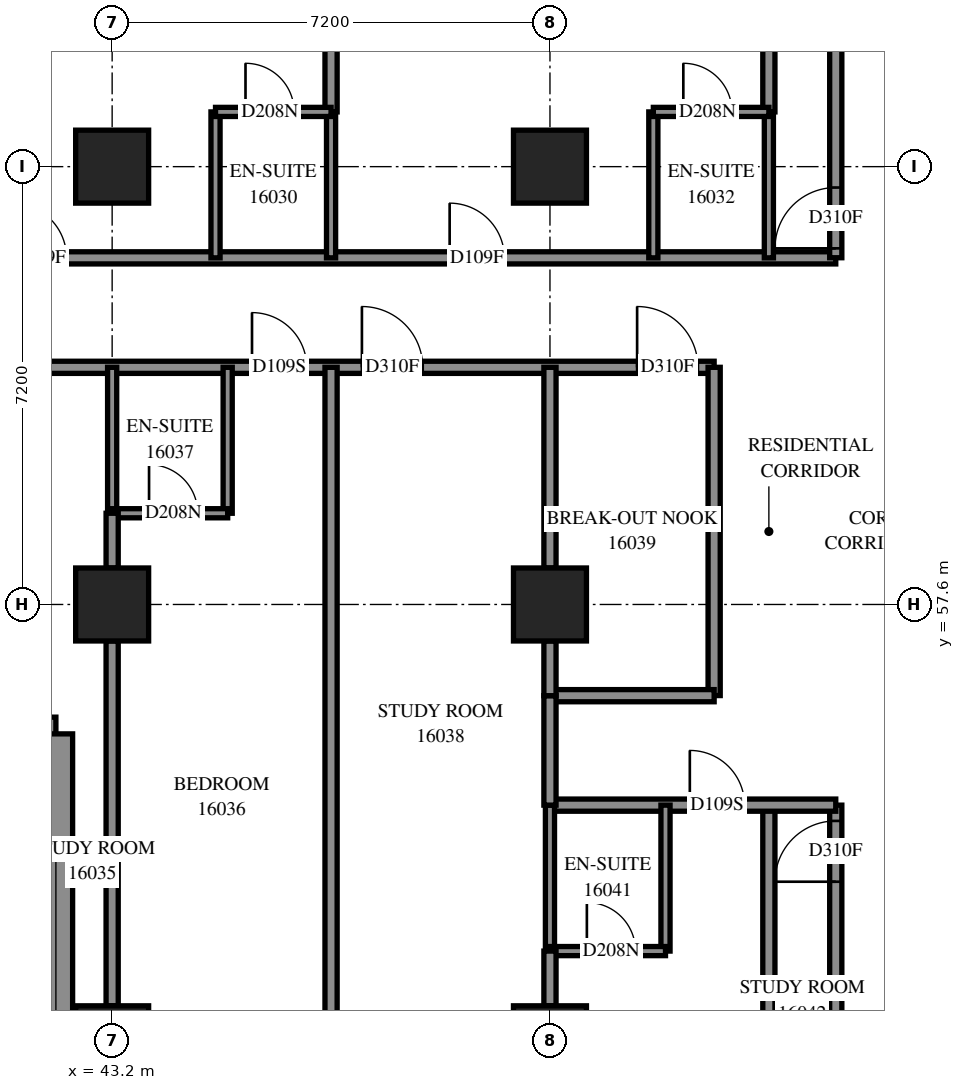
"""IFC4 building model, lengths in metres.
Left out: names, types, materials, properties, quantities, classifications, styles, units other than length and angle.
Written with IfcOpenShell. Run it as: python <this file> out.ifc"""

import sys

from ifc_helpers import new_model, si_unit, direction, frame, frame_2d, origin, origin_2d, place, context, subcontext, project, spatial, polyline, rectangle, outline, extrude, element, fill, save


model = new_model("IFC4")
c1 = context("Model", 3, precision=1e-05, world=origin(), true_north=direction((0.0, 1.0)))
c2 = subcontext(c1, "Body", "Model", "MODEL_VIEW")
j1 = project(units=[si_unit("LENGTHUNIT", "METRE"), si_unit("PLANEANGLEUNIT", "RADIAN")], contexts=[c1])
p1 = place(None, origin())
s1 = spatial("IfcSite", under=j1, at=p1, CompositionType="ELEMENT")
p2 = place(p1, origin())
s2 = spatial("IfcBuilding", under=s1, at=p2, CompositionType="ELEMENT")
p3 = place(p2, frame((0.0, 0.0, 61.0)))
s3 = spatial("IfcBuildingStorey", under=s2, at=p3, CompositionType="ELEMENT", Elevation=61.0)
for number, where, z_axis, x_axis in (
    (1, (43.2, 50.4, 0.0), (0.0, 0.0, 1.0), (1.0, 0.0, 0.0)),
    (2, (43.2, 57.6, 0.0), (0.0, 0.0, 1.0), (1.0, 0.0, 0.0)),
    (3, (43.2, 64.8, 0.0), (0.0, 0.0, 1.0), (1.0, 0.0, 0.0)),
    (4, (50.4, 50.4, 0.0), (0.0, 0.0, 1.0), (1.0, 0.0, 0.0)),
    (5, (50.4, 57.6, 0.0), (0.0, 0.0, 1.0), (1.0, 0.0, 0.0)),
    (6, (50.4, 64.8, 0.0), (0.0, 0.0, 1.0), (1.0, 0.0, 0.0)),
):
    element("IfcColumn", number, at=place(p3, frame(where, z_axis=z_axis, x_axis=x_axis)), inside=s3, PredefinedType="COLUMN", context=c2, shape_type="SweptSolid", body=[
        extrude(rectangle(XDim=1.2, YDim=1.2, at=origin_2d()), origin(), (0.0, 0.0, 1.0), 3.1),
    ])
p4 = place(p3, frame((27.875, 55.472, 0.0), z_axis=(0.0, 0.0, 1.0), x_axis=(1.0, 0.0, 0.0)))
e7 = element("IfcWall", 7, at=p4, inside=s3, PredefinedType="SOLIDWALL", context=c2, shape_type="SweptSolid", body=[
    extrude(outline(polyline([(-0.275, -0.275), (14.125, -0.275), (14.675, 0.275), (0.275, 0.275), (-0.275, -0.275)])), origin(), (0.0, 0.0, 1.0), 3.1),
])
p5 = place(p4, frame((1.325, 0.0, 0.5)))
e8 = element("IfcOpeningElement", 8, at=p5, cuts=e7, PredefinedType="OPENING", context=c2, shape_type="SweptSolid", body=[
    extrude(rectangle(XDim=2.8, YDim=2.45, at=frame_2d((1.4, 1.225))), frame((0.0, 0.285, 0.0), z_axis=(0.0, -1.0, 0.0), x_axis=(1.0, 0.0, 0.0)), (0.0, 0.0, 1.0), 0.57),
])
p6 = place(p4, frame((4.925, 0.0, 0.5)))
e9 = element("IfcOpeningElement", 9, at=p6, cuts=e7, PredefinedType="OPENING", context=c2, shape_type="SweptSolid", body=[
    extrude(rectangle(XDim=2.8, YDim=2.45, at=frame_2d((1.4, 1.225))), frame((0.0, 0.285, 0.0), z_axis=(0.0, -1.0, 0.0), x_axis=(1.0, 0.0, 0.0)), (0.0, 0.0, 1.0), 0.57),
])
p7 = place(p4, frame((8.275, 0.0, 0.5)))
e10 = element("IfcOpeningElement", 10, at=p7, cuts=e7, PredefinedType="OPENING", context=c2, shape_type="SweptSolid", body=[
    extrude(rectangle(XDim=2.8, YDim=2.45, at=frame_2d((1.4, 1.225))), frame((0.0, 0.285, 0.0), z_axis=(0.0, -1.0, 0.0), x_axis=(1.0, 0.0, 0.0)), (0.0, 0.0, 1.0), 0.57),
])
p8 = place(p4, frame((12.363, 0.0, 0.5)))
e11 = element("IfcOpeningElement", 11, at=p8, cuts=e7, PredefinedType="OPENING", context=c2, shape_type="SweptSolid", body=[
    extrude(rectangle(XDim=1.2, YDim=2.45, at=frame_2d((0.6, 1.225))), frame((0.0, 0.285, 0.0), z_axis=(0.0, -1.0, 0.0), x_axis=(1.0, 0.0, 0.0)), (0.0, 0.0, 1.0), 0.57),
])
p9 = place(p3, frame((42.275, 55.472, 0.0), z_axis=(0.0, 0.0, 1.0), x_axis=(0.0, -1.0, 0.0)))
e12 = element("IfcWall", 12, at=p9, inside=s3, PredefinedType="SOLIDWALL", context=c2, shape_type="SweptSolid", body=[
    extrude(outline(polyline([(0.275, -0.275), (6.272, -0.275), (5.722, 0.275), (-0.275, 0.275), (0.275, -0.275)])), origin(), (0.0, 0.0, 1.0), 3.1),
])
p10 = place(p9, frame((1.872, 0.0, 0.5)))
e13 = element("IfcOpeningElement", 13, at=p10, cuts=e12, PredefinedType="OPENING", context=c2, shape_type="SweptSolid", body=[
    extrude(rectangle(XDim=2.8, YDim=2.45, at=frame_2d((1.4, 1.225))), frame((0.0, 0.285, 0.0), z_axis=(0.0, -1.0, 0.0), x_axis=(1.0, 0.0, 0.0)), (0.0, 0.0, 1.0), 0.57),
])
p11 = place(p3, frame((28.8, 61.5, 0.0), z_axis=(0.0, 0.0, 1.0), x_axis=(1.0, 0.0, 0.0)))
e14 = element("IfcWall", 14, at=p11, inside=s3, PredefinedType="PARTITIONING", context=c2, shape_type="SweptSolid", body=[
    extrude(rectangle(XDim=24.3, YDim=0.2, at=frame_2d((12.15, 0.0))), origin(), (0.0, 0.0, 1.0), 3.1),
])
p12 = place(p11, frame((3.899, 0.0, 0.0)))
e15 = element("IfcOpeningElement", 15, at=p12, cuts=e14, PredefinedType="OPENING", context=c2, shape_type="SweptSolid", body=[
    extrude(rectangle(XDim=0.9, YDim=2.1, at=frame_2d((0.45, 1.05))), frame((0.0, 0.11, 0.0), z_axis=(0.0, -1.0, 0.0), x_axis=(1.0, 0.0, 0.0)), (0.0, 0.0, 1.0), 0.22),
])
p13 = place(p11, frame((9.5, 0.0, 0.0)))
e16 = element("IfcOpeningElement", 16, at=p13, cuts=e14, PredefinedType="OPENING", context=c2, shape_type="SweptSolid", body=[
    extrude(rectangle(XDim=0.9, YDim=2.1, at=frame_2d((0.45, 1.05))), frame((0.0, 0.11, 0.0), z_axis=(0.0, -1.0, 0.0), x_axis=(1.0, 0.0, 0.0)), (0.0, 0.0, 1.0), 0.22),
])
p14 = place(p11, frame((11.307, 0.0, 0.0)))
e17 = element("IfcOpeningElement", 17, at=p14, cuts=e14, PredefinedType="OPENING", context=c2, shape_type="SweptSolid", body=[
    extrude(rectangle(XDim=1.0, YDim=2.1, at=frame_2d((0.5, 1.05))), frame((0.0, 0.11, 0.0), z_axis=(0.0, -1.0, 0.0), x_axis=(1.0, 0.0, 0.0)), (0.0, 0.0, 1.0), 0.22),
])
p15 = place(p11, frame((16.7, 0.0, 0.0)))
e18 = element("IfcOpeningElement", 18, at=p15, cuts=e14, PredefinedType="OPENING", context=c2, shape_type="SweptSolid", body=[
    extrude(rectangle(XDim=0.9, YDim=2.1, at=frame_2d((0.45, 1.05))), frame((0.0, 0.11, 0.0), z_axis=(0.0, -1.0, 0.0), x_axis=(1.0, 0.0, 0.0)), (0.0, 0.0, 1.0), 0.22),
])
p16 = place(p11, frame((18.508, 0.0, 0.0)))
e19 = element("IfcOpeningElement", 19, at=p16, cuts=e14, PredefinedType="OPENING", context=c2, shape_type="SweptSolid", body=[
    extrude(rectangle(XDim=1.0, YDim=2.1, at=frame_2d((0.5, 1.05))), frame((0.0, 0.11, 0.0), z_axis=(0.0, -1.0, 0.0), x_axis=(1.0, 0.0, 0.0)), (0.0, 0.0, 1.0), 0.22),
])
p17 = place(p11, frame((23.033, 0.0, 0.0)))
e20 = element("IfcOpeningElement", 20, at=p17, cuts=e14, PredefinedType="OPENING", context=c2, shape_type="SweptSolid", body=[
    extrude(rectangle(XDim=1.0, YDim=2.1, at=frame_2d((0.5, 1.05))), frame((0.0, 0.11, 0.0), z_axis=(0.0, -1.0, 0.0), x_axis=(1.0, 0.0, 0.0)), (0.0, 0.0, 1.0), 0.22),
])
p18 = place(p3, frame((33.302, 63.3, 0.0), z_axis=(0.0, 0.0, 1.0), x_axis=(1.0, 0.0, 0.0)))
e21 = element("IfcWall", 21, at=p18, inside=s3, PredefinedType="PARTITIONING", context=c2, shape_type="SweptSolid", body=[
    extrude(rectangle(XDim=21.798, YDim=0.2, at=frame_2d((10.899, 0.0))), origin(), (0.0, 0.0, 1.0), 3.1),
])
p19 = place(p18, frame((1.091, 0.0, 0.0)))
e22 = element("IfcOpeningElement", 22, at=p19, cuts=e21, PredefinedType="OPENING", context=c2, shape_type="SweptSolid", body=[
    extrude(rectangle(XDim=0.9, YDim=2.1, at=frame_2d((0.45, 1.05))), frame((0.0, 0.11, 0.0), z_axis=(0.0, -1.0, 0.0), x_axis=(1.0, 0.0, 0.0)), (0.0, 0.0, 1.0), 0.22),
])
p20 = place(p18, frame((8.248, 0.0, 0.0)))
e23 = element("IfcOpeningElement", 23, at=p20, cuts=e21, PredefinedType="OPENING", context=c2, shape_type="SweptSolid", body=[
    extrude(rectangle(XDim=0.9, YDim=2.1, at=frame_2d((0.45, 1.05))), frame((0.0, 0.11, 0.0), z_axis=(0.0, -1.0, 0.0), x_axis=(1.0, 0.0, 0.0)), (0.0, 0.0, 1.0), 0.22),
])
p21 = place(p18, frame((15.448, 0.0, 0.0)))
e24 = element("IfcOpeningElement", 24, at=p21, cuts=e21, PredefinedType="OPENING", context=c2, shape_type="SweptSolid", body=[
    extrude(rectangle(XDim=0.9, YDim=2.1, at=frame_2d((0.45, 1.05))), frame((0.0, 0.11, 0.0), z_axis=(0.0, -1.0, 0.0), x_axis=(1.0, 0.0, 0.0)), (0.0, 0.0, 1.0), 0.22),
])
p22 = place(p3, frame((54.0, 42.312, 0.0), z_axis=(0.0, 0.0, 1.0), x_axis=(0.0, 1.0, 0.0)))
e25 = element("IfcWall", 25, at=p22, inside=s3, PredefinedType="PARTITIONING", context=c2, shape_type="SweptSolid", body=[
    extrude(rectangle(XDim=11.988, YDim=0.2, at=frame_2d((5.994, 0.0))), origin(), (0.0, 0.0, 1.0), 3.1),
])
p23 = place(p3, frame((46.8, 49.75, 0.0), z_axis=(0.0, 0.0, 1.0), x_axis=(0.0, 1.0, 0.0)))
e26 = element("IfcWall", 26, at=p23, inside=s3, PredefinedType="PARTITIONING", context=c2, shape_type="SweptSolid", body=[
    extrude(rectangle(XDim=11.75, YDim=0.2, at=frame_2d((5.875, 0.0))), origin(), (0.0, 0.0, 1.0), 3.1),
])
p24 = place(p3, frame((46.8, 65.7, 0.0), z_axis=(0.0, 0.0, 1.0), x_axis=(0.0, 1.0, 0.0)))
e27 = element("IfcWall", 27, at=p24, inside=s3, PredefinedType="PARTITIONING", context=c2, shape_type="SweptSolid", body=[
    extrude(rectangle(XDim=7.088, YDim=0.2, at=frame_2d((3.544, 0.0))), origin(), (0.0, 0.0, 1.0), 3.1),
])
p25 = place(p3, frame((54.0, 65.7, 0.0), z_axis=(0.0, 0.0, 1.0), x_axis=(0.0, 1.0, 0.0)))
e28 = element("IfcWall", 28, at=p25, inside=s3, PredefinedType="PARTITIONING", context=c2, shape_type="SweptSolid", body=[
    extrude(rectangle(XDim=7.021, YDim=0.2, at=frame_2d((3.51, 0.0))), origin(), (0.0, 0.0, 1.0), 3.1),
])
p26 = place(p3, frame((55.1, 47.9, 0.0), z_axis=(0.0, 0.0, 1.0), x_axis=(0.0, 1.0, 0.0)))
e29 = element("IfcWall", 29, at=p26, inside=s3, PredefinedType="PARTITIONING", context=c2, shape_type="SweptSolid", body=[
    extrude(rectangle(XDim=6.4, YDim=0.2, at=frame_2d((3.2, 0.0))), origin(), (0.0, 0.0, 1.0), 3.1),
])
p27 = place(p26, frame((5.141, 0.0, 0.0)))
e30 = element("IfcOpeningElement", 30, at=p27, cuts=e29, PredefinedType="OPENING", context=c2, shape_type="SweptSolid", body=[
    extrude(rectangle(XDim=1.0, YDim=2.1, at=frame_2d((0.5, 1.05))), frame((0.0, 0.11, 0.0), z_axis=(0.0, -1.0, 0.0), x_axis=(1.0, 0.0, 0.0)), (0.0, 0.0, 1.0), 0.22),
])
p28 = place(p3, frame((43.2, 51.0, 0.0), z_axis=(0.0, 0.0, 1.0), x_axis=(0.0, 1.0, 0.0)))
e31 = element("IfcWall", 31, at=p28, inside=s3, PredefinedType="PARTITIONING", context=c2, shape_type="SweptSolid", body=[
    extrude(rectangle(XDim=6.0, YDim=0.2, at=frame_2d((3.0, 0.0))), origin(), (0.0, 0.0, 1.0), 2.6),
])
p29 = place(p3, frame((53.1, 56.102, 0.0), z_axis=(0.0, 0.0, 1.0), x_axis=(0.0, 1.0, 0.0)))
e32 = element("IfcWall", 32, at=p29, inside=s3, PredefinedType="PARTITIONING", context=c2, shape_type="SweptSolid", body=[
    extrude(rectangle(XDim=5.398, YDim=0.2, at=frame_2d((2.699, 0.0))), origin(), (0.0, 0.0, 1.0), 3.1),
])
p30 = place(p3, frame((50.4, 54.3, 0.0), z_axis=(0.0, 0.0, 1.0), x_axis=(1.0, 0.0, 0.0)))
e33 = element("IfcWall", 33, at=p30, inside=s3, PredefinedType="PARTITIONING", context=c2, shape_type="SweptSolid", body=[
    extrude(rectangle(XDim=4.7, YDim=0.2, at=frame_2d((2.35, 0.0))), origin(), (0.0, 0.0, 1.0), 3.1),
])
p31 = place(p30, frame((2.3, 0.0, 0.0)))
e34 = element("IfcOpeningElement", 34, at=p31, cuts=e33, PredefinedType="OPENING", context=c2, shape_type="SweptSolid", body=[
    extrude(rectangle(XDim=0.9, YDim=2.1, at=frame_2d((0.45, 1.05))), frame((0.0, 0.11, 0.0), z_axis=(0.0, -1.0, 0.0), x_axis=(1.0, 0.0, 0.0)), (0.0, 0.0, 1.0), 0.22),
])
p32 = place(p3, frame((55.1, 63.302, 0.0), z_axis=(0.0, 0.0, 1.0), x_axis=(0.0, 1.0, 0.0)))
e35 = element("IfcWall", 35, at=p32, inside=s3, PredefinedType="PARTITIONING", context=c2, shape_type="SweptSolid", body=[
    extrude(rectangle(XDim=3.998, YDim=0.2, at=frame_2d((1.999, 0.0))), origin(), (0.0, 0.0, 1.0), 3.1),
])
p33 = place(p32, frame((0.154, 0.0, 0.0)))
e36 = element("IfcOpeningElement", 36, at=p33, cuts=e35, PredefinedType="OPENING", context=c2, shape_type="SweptSolid", body=[
    extrude(rectangle(XDim=1.0, YDim=2.1, at=frame_2d((0.5, 1.05))), frame((0.0, 0.11, 0.0), z_axis=(0.0, -1.0, 0.0), x_axis=(1.0, 0.0, 0.0)), (0.0, 0.0, 1.0), 0.22),
])
p34 = place(p3, frame((50.4, 58.2, 0.0), z_axis=(0.0, 0.0, 1.0), x_axis=(0.0, 1.0, 0.0)))
e37 = element("IfcWall", 37, at=p34, inside=s3, PredefinedType="PARTITIONING", context=c2, shape_type="SweptSolid", body=[
    extrude(rectangle(XDim=3.3, YDim=0.2, at=frame_2d((1.65, 0.0))), origin(), (0.0, 0.0, 1.0), 3.1),
])
p35 = place(p3, frame((50.4, 56.1, 0.0), z_axis=(0.0, 0.0, 1.0), x_axis=(1.0, 0.0, 0.0)))
e38 = element("IfcWall", 38, at=p35, inside=s3, PredefinedType="PARTITIONING", context=c2, shape_type="SweptSolid", body=[
    extrude(rectangle(XDim=2.7, YDim=0.2, at=frame_2d((1.35, 0.0))), origin(), (0.0, 0.0, 1.0), 3.1),
])
for number, where, z_axis, x_axis in (
    (39, (44.9, 63.3, 0.0), (0.0, 0.0, 1.0), (0.0, 1.0, 0.0)),
    (40, (46.8, 63.3, 0.0), (0.0, 0.0, 1.0), (0.0, 1.0, 0.0)),
    (41, (52.1, 63.3, 0.0), (0.0, 0.0, 1.0), (0.0, 1.0, 0.0)),
    (42, (54.0, 63.3, 0.0), (0.0, 0.0, 1.0), (0.0, 1.0, 0.0)),
    (43, (45.1, 59.1, 0.0), (0.0, 0.0, 1.0), (0.0, 1.0, 0.0)),
    (44, (43.2, 59.1, 0.0), (0.0, 0.0, 1.0), (0.0, 1.0, 0.0)),
    (45, (52.3, 51.9, 0.0), (0.0, 0.0, 1.0), (0.0, 1.0, 0.0)),
    (46, (50.4, 51.9, 0.0), (0.0, 0.0, 1.0), (0.0, 1.0, 0.0)),
):
    element("IfcWall", number, at=place(p3, frame(where, z_axis=z_axis, x_axis=x_axis)), inside=s3, PredefinedType="PARTITIONING", context=c2, shape_type="SweptSolid", body=[
        extrude(rectangle(XDim=2.4, YDim=0.15, at=frame_2d((1.2, 0.0))), origin(), (0.0, 0.0, 1.0), 3.1),
    ])
p36 = place(p3, frame((43.2, 59.1, 0.0), z_axis=(0.0, 0.0, 1.0), x_axis=(1.0, 0.0, 0.0)))
e47 = element("IfcWall", 47, at=p36, inside=s3, PredefinedType="PARTITIONING", context=c2, shape_type="SweptSolid", body=[
    extrude(rectangle(XDim=1.9, YDim=0.15, at=frame_2d((0.95, 0.0))), origin(), (0.0, 0.0, 1.0), 3.1),
])
p37 = place(p36, frame((0.607, 0.0, 0.0)))
e48 = element("IfcOpeningElement", 48, at=p37, cuts=e47, PredefinedType="OPENING", context=c2, shape_type="SweptSolid", body=[
    extrude(rectangle(XDim=0.8, YDim=2.1, at=frame_2d((0.4, 1.05))), frame((0.0, 0.085, 0.0), z_axis=(0.0, -1.0, 0.0), x_axis=(1.0, 0.0, 0.0)), (0.0, 0.0, 1.0), 0.17),
])
p38 = place(p3, frame((44.9, 65.7, 0.0), z_axis=(0.0, 0.0, 1.0), x_axis=(1.0, 0.0, 0.0)))
e49 = element("IfcWall", 49, at=p38, inside=s3, PredefinedType="PARTITIONING", context=c2, shape_type="SweptSolid", body=[
    extrude(rectangle(XDim=1.9, YDim=0.15, at=frame_2d((0.95, 0.0))), origin(), (0.0, 0.0, 1.0), 3.1),
])
p39 = place(p38, frame((0.493, 0.0, 0.0)))
e50 = element("IfcOpeningElement", 50, at=p39, cuts=e49, PredefinedType="OPENING", context=c2, shape_type="SweptSolid", body=[
    extrude(rectangle(XDim=0.8, YDim=2.1, at=frame_2d((0.4, 1.05))), frame((0.0, 0.085, 0.0), z_axis=(0.0, -1.0, 0.0), x_axis=(1.0, 0.0, 0.0)), (0.0, 0.0, 1.0), 0.17),
])
p40 = place(p3, frame((52.1, 65.7, 0.0), z_axis=(0.0, 0.0, 1.0), x_axis=(1.0, 0.0, 0.0)))
e51 = element("IfcWall", 51, at=p40, inside=s3, PredefinedType="PARTITIONING", context=c2, shape_type="SweptSolid", body=[
    extrude(rectangle(XDim=1.9, YDim=0.15, at=frame_2d((0.95, 0.0))), origin(), (0.0, 0.0, 1.0), 3.1),
])
p41 = place(p40, frame((0.493, 0.0, 0.0)))
e52 = element("IfcOpeningElement", 52, at=p41, cuts=e51, PredefinedType="OPENING", context=c2, shape_type="SweptSolid", body=[
    extrude(rectangle(XDim=0.8, YDim=2.1, at=frame_2d((0.4, 1.05))), frame((0.0, 0.085, 0.0), z_axis=(0.0, -1.0, 0.0), x_axis=(1.0, 0.0, 0.0)), (0.0, 0.0, 1.0), 0.17),
])
p42 = place(p3, frame((50.4, 51.9, 0.0), z_axis=(0.0, 0.0, 1.0), x_axis=(1.0, 0.0, 0.0)))
e53 = element("IfcWall", 53, at=p42, inside=s3, PredefinedType="PARTITIONING", context=c2, shape_type="SweptSolid", body=[
    extrude(rectangle(XDim=1.9, YDim=0.15, at=frame_2d((0.95, 0.0))), origin(), (0.0, 0.0, 1.0), 3.1),
])
p43 = place(p42, frame((0.607, 0.0, 0.0)))
e54 = element("IfcOpeningElement", 54, at=p43, cuts=e53, PredefinedType="OPENING", context=c2, shape_type="SweptSolid", body=[
    extrude(rectangle(XDim=0.8, YDim=2.1, at=frame_2d((0.4, 1.05))), frame((0.0, 0.085, 0.0), z_axis=(0.0, -1.0, 0.0), x_axis=(1.0, 0.0, 0.0)), (0.0, 0.0, 1.0), 0.17),
])
p44 = place(p3, frame((50.4, 54.3, 0.0), z_axis=(0.0, 0.0, 1.0), x_axis=(0.0, 1.0, 0.0)))
e55 = element("IfcWall", 55, at=p44, inside=s3, PredefinedType="PARTITIONING", context=c2, shape_type="SweptSolid", body=[
    extrude(rectangle(XDim=1.8, YDim=0.2, at=frame_2d((0.9, 0.0))), origin(), (0.0, 0.0, 1.0), 3.1),
])
for number, where, z_axis, x_axis in (
    (56, (43.2, 58.2, 0.0), (0.0, 0.0, 1.0), (0.0, 1.0, 0.0)),
    (57, (50.4, 51.0, 0.0), (0.0, 0.0, 1.0), (0.0, 1.0, 0.0)),
    (58, (50.4, 56.1, 0.0), (0.0, 0.0, 1.0), (0.0, 1.0, 0.0)),
):
    element("IfcWall", number, at=place(p3, frame(where, z_axis=z_axis, x_axis=x_axis)), inside=s3, PredefinedType="PARTITIONING", context=c2, shape_type="SweptSolid", body=[
        extrude(rectangle(XDim=0.9, YDim=0.2, at=frame_2d((0.45, 0.0))), origin(), (0.0, 0.0, 1.0), 3.1),
    ])
p45 = place(p10, origin())
e59 = element("IfcWindow", 59, at=p45, inside=s3, PartitioningType="SINGLE_PANEL", PredefinedType="WINDOW", context=c2, shape_type="SweptSolid", body=[
    extrude(rectangle(XDim=2.8, YDim=2.45, at=frame_2d((1.4, 1.225))), frame((0.0, 0.155, 0.0), z_axis=(0.0, -1.0, 0.0), x_axis=(1.0, 0.0, 0.0)), (0.0, 0.0, 1.0), 0.06),
])
fill(e13, e59)
p46 = place(p20, origin())
e60 = element("IfcDoor", 60, at=p46, inside=s3, OperationType="SINGLE_SWING_LEFT", PredefinedType="DOOR", context=c2, shape_type="SweptSolid", body=[
    extrude(rectangle(XDim=0.9, YDim=2.1, at=frame_2d((0.45, 1.05))), frame((0.0, 0.025, 0.0), z_axis=(0.0, -1.0, 0.0), x_axis=(1.0, 0.0, 0.0)), (0.0, 0.0, 1.0), 0.05),
])
fill(e23, e60)
p47 = place(p39, origin())
e61 = element("IfcDoor", 61, at=p47, inside=s3, OperationType="SINGLE_SWING_RIGHT", PredefinedType="DOOR", context=c2, shape_type="SweptSolid", body=[
    extrude(rectangle(XDim=0.8, YDim=2.1, at=frame_2d((0.4, 1.05))), frame((0.0, 0.025, 0.0), z_axis=(0.0, -1.0, 0.0), x_axis=(1.0, 0.0, 0.0)), (0.0, 0.0, 1.0), 0.05),
])
fill(e50, e61)
p48 = place(p21, origin())
e62 = element("IfcDoor", 62, at=p48, inside=s3, OperationType="SINGLE_SWING_LEFT", PredefinedType="DOOR", context=c2, shape_type="SweptSolid", body=[
    extrude(rectangle(XDim=0.9, YDim=2.1, at=frame_2d((0.45, 1.05))), frame((0.0, 0.025, 0.0), z_axis=(0.0, -1.0, 0.0), x_axis=(1.0, 0.0, 0.0)), (0.0, 0.0, 1.0), 0.05),
])
fill(e24, e62)
p49 = place(p41, origin())
e63 = element("IfcDoor", 63, at=p49, inside=s3, OperationType="SINGLE_SWING_RIGHT", PredefinedType="DOOR", context=c2, shape_type="SweptSolid", body=[
    extrude(rectangle(XDim=0.8, YDim=2.1, at=frame_2d((0.4, 1.05))), frame((0.0, 0.025, 0.0), z_axis=(0.0, -1.0, 0.0), x_axis=(1.0, 0.0, 0.0)), (0.0, 0.0, 1.0), 0.05),
])
fill(e52, e63)
p50 = place(p33, origin())
e64 = element("IfcDoor", 64, at=p50, inside=s3, OperationType="SINGLE_SWING_LEFT", PredefinedType="DOOR", context=c2, shape_type="SweptSolid", body=[
    extrude(rectangle(XDim=1.0, YDim=2.1, at=frame_2d((0.5, 1.05))), frame((0.0, 0.025, 0.0), z_axis=(0.0, -1.0, 0.0), x_axis=(1.0, 0.0, 0.0)), (0.0, 0.0, 1.0), 0.05),
])
fill(e36, e64)
p51 = place(p15, origin())
e65 = element("IfcDoor", 65, at=p51, inside=s3, OperationType="SINGLE_SWING_LEFT", PredefinedType="DOOR", context=c2, shape_type="SweptSolid", body=[
    extrude(rectangle(XDim=0.9, YDim=2.1, at=frame_2d((0.45, 1.05))), frame((0.0, 0.025, 0.0), z_axis=(0.0, -1.0, 0.0), x_axis=(1.0, 0.0, 0.0)), (0.0, 0.0, 1.0), 0.05),
])
fill(e18, e65)
p52 = place(p37, origin())
e66 = element("IfcDoor", 66, at=p52, inside=s3, OperationType="SINGLE_SWING_RIGHT", PredefinedType="DOOR", context=c2, shape_type="SweptSolid", body=[
    extrude(rectangle(XDim=0.8, YDim=2.1, at=frame_2d((0.4, 1.05))), frame((0.0, 0.025, 0.0), z_axis=(0.0, -1.0, 0.0), x_axis=(1.0, 0.0, 0.0)), (0.0, 0.0, 1.0), 0.05),
])
fill(e48, e66)
p53 = place(p16, origin())
e67 = element("IfcDoor", 67, at=p53, inside=s3, OperationType="SINGLE_SWING_RIGHT", PredefinedType="DOOR", context=c2, shape_type="SweptSolid", body=[
    extrude(rectangle(XDim=1.0, YDim=2.1, at=frame_2d((0.5, 1.05))), frame((0.0, 0.025, 0.0), z_axis=(0.0, -1.0, 0.0), x_axis=(1.0, 0.0, 0.0)), (0.0, 0.0, 1.0), 0.05),
])
fill(e19, e67)
p54 = place(p17, origin())
e68 = element("IfcDoor", 68, at=p54, inside=s3, OperationType="SINGLE_SWING_LEFT", PredefinedType="DOOR", context=c2, shape_type="SweptSolid", body=[
    extrude(rectangle(XDim=1.0, YDim=2.1, at=frame_2d((0.5, 1.05))), frame((0.0, 0.025, 0.0), z_axis=(0.0, -1.0, 0.0), x_axis=(1.0, 0.0, 0.0)), (0.0, 0.0, 1.0), 0.05),
])
fill(e20, e68)
p55 = place(p31, origin())
e69 = element("IfcDoor", 69, at=p55, inside=s3, OperationType="SINGLE_SWING_LEFT", PredefinedType="DOOR", context=c2, shape_type="SweptSolid", body=[
    extrude(rectangle(XDim=0.9, YDim=2.1, at=frame_2d((0.45, 1.05))), frame((0.0, 0.025, 0.0), z_axis=(0.0, -1.0, 0.0), x_axis=(1.0, 0.0, 0.0)), (0.0, 0.0, 1.0), 0.05),
])
fill(e34, e69)
p56 = place(p43, origin())
e70 = element("IfcDoor", 70, at=p56, inside=s3, OperationType="SINGLE_SWING_RIGHT", PredefinedType="DOOR", context=c2, shape_type="SweptSolid", body=[
    extrude(rectangle(XDim=0.8, YDim=2.1, at=frame_2d((0.4, 1.05))), frame((0.0, 0.025, 0.0), z_axis=(0.0, -1.0, 0.0), x_axis=(1.0, 0.0, 0.0)), (0.0, 0.0, 1.0), 0.05),
])
fill(e54, e70)
p57 = place(p27, origin())
e71 = element("IfcDoor", 71, at=p57, inside=s3, OperationType="SINGLE_SWING_RIGHT", PredefinedType="DOOR", context=c2, shape_type="SweptSolid", body=[
    extrude(rectangle(XDim=1.0, YDim=2.1, at=frame_2d((0.5, 1.05))), frame((0.0, 0.025, 0.0), z_axis=(0.0, -1.0, 0.0), x_axis=(1.0, 0.0, 0.0)), (0.0, 0.0, 1.0), 0.05),
])
fill(e30, e71)
save(model, sys.argv[1])
